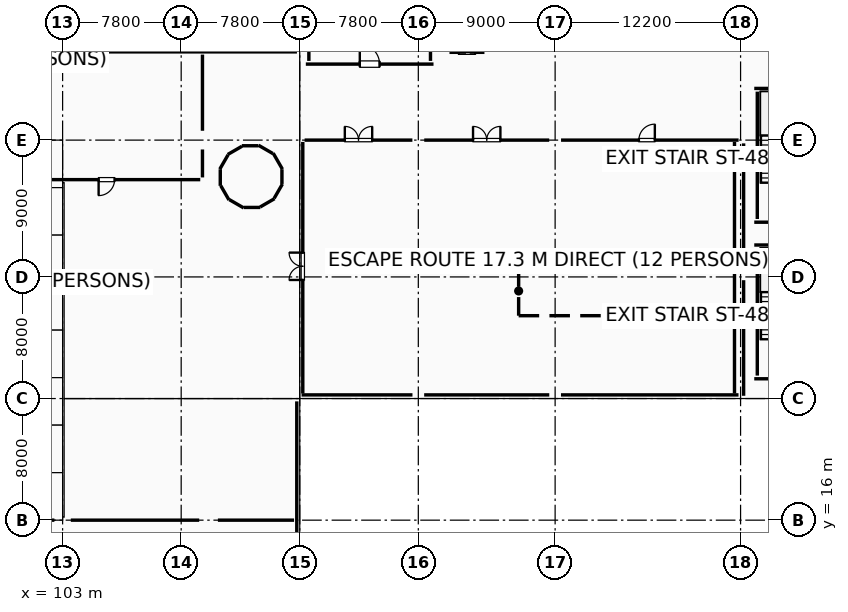
"""IFC4 building model, lengths in metres.
Left out: names, types, materials, properties, quantities, classifications, styles, units other than length and angle.
Written with IfcOpenShell. Run it as: python <this file> out.ifc"""

import sys

from ifc_helpers import new_model, si_unit, direction, frame, frame_2d, origin, origin_2d, place, context, subcontext, project, spatial, rectangle, i_section, extrude, element, fill, save


model = new_model("IFC4")
c1 = context("Model", 3, precision=1e-05, world=origin(), true_north=direction((0.0, 1.0)))
c2 = subcontext(c1, "Body", "Model", "MODEL_VIEW")
j1 = project(units=[si_unit("LENGTHUNIT", "METRE"), si_unit("PLANEANGLEUNIT", "RADIAN")], contexts=[c1])
p1 = place(None, origin())
s1 = spatial("IfcSite", under=j1, at=p1, CompositionType="ELEMENT")
p2 = place(p1, origin())
s2 = spatial("IfcBuilding", under=s1, at=p2, CompositionType="ELEMENT")
p3 = place(p2, frame((0.0, 0.0, 5.4)))
s3 = spatial("IfcBuildingStorey", under=s2, at=p3, CompositionType="ELEMENT", Elevation=5.4)
for number, where, z_axis, x_axis in (
    (1, (126.4, 24.0, 0.0), (0.0, 0.0, 1.0), (1.0, 0.0, 0.0)),
    (2, (126.4, 32.0, 0.0), (0.0, 0.0, 1.0), (1.0, 0.0, 0.0)),
    (3, (126.4, 41.0, 0.0), (0.0, 0.0, 1.0), (1.0, 0.0, 0.0)),
    (4, (135.4, 24.0, 0.0), (0.0, 0.0, 1.0), (1.0, 0.0, 0.0)),
    (5, (135.4, 41.0, 0.0), (0.0, 0.0, 1.0), (1.0, 0.0, 0.0)),
):
    element("IfcColumn", number, at=place(p3, frame(where, z_axis=z_axis, x_axis=x_axis)), inside=s3, PredefinedType="COLUMN", context=c2, shape_type="SweptSolid", body=[
        extrude(rectangle(XDim=0.75, YDim=0.75, at=origin_2d()), origin(), (0.0, 0.0, 1.0), 4.8),
    ])
for number, where, z_axis, x_axis in (
    (6, (147.6, 24.0, 0.0), (0.0, 0.0, 1.0), (1.0, 0.0, 0.0)),
    (7, (147.6, 32.0, 0.0), (0.0, 0.0, 1.0), (1.0, 0.0, 0.0)),
    (8, (147.6, 41.0, 0.0), (0.0, 0.0, 1.0), (1.0, 0.0, 0.0)),
):
    element("IfcColumn", number, at=place(p3, frame(where, z_axis=z_axis, x_axis=x_axis)), inside=s3, PredefinedType="COLUMN", context=c2, shape_type="SweptSolid", body=[
        extrude(i_section(OverallWidth=0.25, OverallDepth=0.4, WebThickness=0.01, FlangeThickness=0.013, FilletRadius=0.014, at=origin_2d()), origin(), (0.0, 0.0, 1.0), 4.8),
    ])
p4 = place(p3, frame((103.0, 47.0, 0.0), z_axis=(0.0, 0.0, 1.0), x_axis=(1.0, 0.0, 0.0)))
e9 = element("IfcColumn", 9, at=p4, inside=s3, PredefinedType="COLUMN", context=c2, shape_type="SweptSolid", body=[
    extrude(i_section(OverallWidth=0.25, OverallDepth=0.45, WebThickness=0.011, FlangeThickness=0.014, FilletRadius=0.015, at=origin_2d()), origin(), (0.0, 0.0, 1.0), 4.8),
])
for number, where, z_axis, x_axis in (
    (10, (103.0, 16.0, 0.0), (0.0, 0.0, 1.0), (1.0, 0.0, 0.0)),
    (11, (103.0, 41.0, 0.0), (0.0, 0.0, 1.0), (1.0, 0.0, 0.0)),
):
    element("IfcColumn", number, at=place(p3, frame(where, z_axis=z_axis, x_axis=x_axis)), inside=s3, PredefinedType="COLUMN", context=c2, shape_type="SweptSolid", body=[
        extrude(rectangle(XDim=1.05, YDim=1.05, at=origin_2d()), origin(), (0.0, 0.0, 1.0), 4.8),
    ])
for number, where, z_axis, x_axis in (
    (12, (112.6, 16.0, 0.0), (0.0, 0.0, 1.0), (1.0, 0.0, 0.0)),
    (13, (112.6, 41.0, 0.0), (0.0, 0.0, 1.0), (1.0, 0.0, 0.0)),
):
    element("IfcColumn", number, at=place(p3, frame(where, z_axis=z_axis, x_axis=x_axis)), inside=s3, PredefinedType="COLUMN", context=c2, shape_type="SweptSolid", body=[
        extrude(rectangle(XDim=1.2, YDim=1.2, at=origin_2d()), origin(), (0.0, 0.0, 1.0), 4.8),
    ])
p5 = place(p3, frame((103.129, 46.805, 0.0), z_axis=(0.0, 0.0, 1.0), x_axis=(1.0, 0.0, 0.0)))
e14 = element("IfcWall", 14, at=p5, inside=s3, PredefinedType="STANDARD", context=c2, shape_type="SweptSolid", body=[
    extrude(rectangle(XDim=15.286, YDim=0.35, at=frame_2d((7.643, 0.0))), origin(), (0.0, 0.0, 1.0), 3.725),
])
p6 = place(p3, frame((147.465, 24.24, 0.0), z_axis=(0.0, 0.0, 1.0), x_axis=(-1.0, 0.0, 0.0)))
e15 = element("IfcWall", 15, at=p6, inside=s3, PredefinedType="PARAPET", context=c2, shape_type="SweptSolid", body=[
    extrude(rectangle(XDim=11.68, YDim=0.18, at=frame_2d((5.84, 0.0))), origin(), (0.0, 0.0, 1.0), 0.88),
])
p7 = place(p3, frame((135.015, 24.24, 0.0), z_axis=(0.0, 0.0, 1.0), x_axis=(-1.0, 0.0, 0.0)))
e16 = element("IfcWall", 16, at=p7, inside=s3, PredefinedType="PARAPET", context=c2, shape_type="SweptSolid", body=[
    extrude(rectangle(XDim=8.23, YDim=0.18, at=frame_2d((4.115, 0.0))), origin(), (0.0, 0.0, 1.0), 0.88),
])
p8 = place(p3, frame((126.015, 24.24, 0.0), z_axis=(0.0, 0.0, 1.0), x_axis=(-1.0, 0.0, 0.0)))
e17 = element("IfcWall", 17, at=p8, inside=s3, PredefinedType="PARAPET", context=c2, shape_type="SweptSolid", body=[
    extrude(rectangle(XDim=7.295, YDim=0.18, at=frame_2d((3.647, 0.0))), origin(), (0.0, 0.0, 1.0), 0.88),
])
p9 = place(p3, frame((118.405, 23.815, 0.0), z_axis=(0.0, 0.0, 1.0), x_axis=(0.0, -1.0, 0.0)))
e18 = element("IfcWall", 18, at=p9, inside=s3, PredefinedType="STANDARD", context=c2, shape_type="SweptSolid", body=[
    extrude(rectangle(XDim=13.63, YDim=0.35, at=frame_2d((6.815, 0.0))), origin(), (0.0, 0.0, 1.0), 3.725),
])
p10 = place(p3, frame((119.0, 46.0, 0.0), z_axis=(0.0, 0.0, 1.0), x_axis=(1.0, 0.0, 0.0)))
e19 = element("IfcWall", 19, at=p10, inside=s3, PredefinedType="SHEAR", context=c2, shape_type="SweptSolid", body=[
    extrude(rectangle(XDim=8.4, YDim=0.4, at=frame_2d((4.2, 0.0))), origin(), (0.0, 0.0, 1.0), 4.54),
])
p11 = place(p10, frame((3.55, 0.0, 0.0)))
e20 = element("IfcOpeningElement", 20, at=p11, cuts=e19, PredefinedType="OPENING", context=c2, shape_type="SweptSolid", body=[
    extrude(rectangle(XDim=1.3, YDim=2.15, at=frame_2d((0.65, 1.075))), frame((0.0, 0.21, 0.0), z_axis=(0.0, -1.0, 0.0), x_axis=(1.0, 0.0, 0.0)), (0.0, 0.0, 1.0), 0.42),
])
for number, where, z_axis, x_axis in (
    (21, (127.2, 46.21, 0.0), (0.0, 0.0, 1.0), (0.0, 1.0, 0.0)),
    (22, (119.2, 54.59, 0.0), (0.0, 0.0, 1.0), (0.0, -1.0, 0.0)),
):
    element("IfcWall", number, at=place(p3, frame(where, z_axis=z_axis, x_axis=x_axis)), inside=s3, PredefinedType="SHEAR", context=c2, shape_type="SweptSolid", body=[
        extrude(rectangle(XDim=8.38, YDim=0.4, at=frame_2d((4.19, 0.0))), origin(), (0.0, 0.0, 1.0), 4.54),
    ])
p12 = place(p3, frame((128.45, 46.775, 0.0), z_axis=(0.0, 0.0, 1.0), x_axis=(1.0, 0.0, 0.0)))
e23 = element("IfcWall", 23, at=p12, inside=s3, PredefinedType="STANDARD", context=c2, shape_type="SweptSolid", body=[
    extrude(rectangle(XDim=2.3, YDim=0.25, at=frame_2d((1.15, 0.0))), origin(), (0.0, 0.0, 1.0), 4.53),
])
p13 = place(p12, frame((0.6, 0.0, 0.0)))
e24 = element("IfcOpeningElement", 24, at=p13, cuts=e23, PredefinedType="OPENING", context=c2, shape_type="SweptSolid", body=[
    extrude(rectangle(XDim=1.1, YDim=2.15, at=frame_2d((0.55, 1.075))), frame((0.0, 0.135, 0.0), z_axis=(0.0, -1.0, 0.0), x_axis=(1.0, 0.0, 0.0)), (0.0, 0.0, 1.0), 0.27),
])
p14 = place(p3, frame((148.5, 25.3, 0.0), z_axis=(0.0, 0.0, 1.0), x_axis=(1.0, 0.0, 0.0)))
e25 = element("IfcWall", 25, at=p14, inside=s3, PredefinedType="SHEAR", context=c2, shape_type="SweptSolid", body=[
    extrude(rectangle(XDim=8.4, YDim=0.4, at=frame_2d((4.2, 0.0))), origin(), (0.0, 0.0, 1.0), 4.54),
])
p15 = place(p14, frame((3.55, 0.0, 0.0)))
e26 = element("IfcOpeningElement", 26, at=p15, cuts=e25, PredefinedType="OPENING", context=c2, shape_type="SweptSolid", body=[
    extrude(rectangle(XDim=1.3, YDim=2.15, at=frame_2d((0.65, 1.075))), frame((0.0, 0.21, 0.0), z_axis=(0.0, -1.0, 0.0), x_axis=(1.0, 0.0, 0.0)), (0.0, 0.0, 1.0), 0.42),
])
p16 = place(p3, frame((156.9, 34.1, 0.0), z_axis=(0.0, 0.0, 1.0), x_axis=(-1.0, 0.0, 0.0)))
e27 = element("IfcWall", 27, at=p16, inside=s3, PredefinedType="SHEAR", context=c2, shape_type="SweptSolid", body=[
    extrude(rectangle(XDim=8.4, YDim=0.4, at=frame_2d((4.2, 0.0))), origin(), (0.0, 0.0, 1.0), 4.54),
])
p17 = place(p3, frame((148.7, 33.89, 0.0), z_axis=(0.0, 0.0, 1.0), x_axis=(0.0, -1.0, 0.0)))
e28 = element("IfcWall", 28, at=p17, inside=s3, PredefinedType="SHEAR", context=c2, shape_type="SweptSolid", body=[
    extrude(rectangle(XDim=8.38, YDim=0.4, at=frame_2d((4.19, 0.0))), origin(), (0.0, 0.0, 1.0), 4.54),
])
p18 = place(p3, frame((148.5, 35.6, 0.0), z_axis=(0.0, 0.0, 1.0), x_axis=(1.0, 0.0, 0.0)))
e29 = element("IfcWall", 29, at=p18, inside=s3, PredefinedType="SHEAR", context=c2, shape_type="SweptSolid", body=[
    extrude(rectangle(XDim=8.4, YDim=0.4, at=frame_2d((4.2, 0.0))), origin(), (0.0, 0.0, 1.0), 4.54),
])
p19 = place(p18, frame((3.55, 0.0, 0.0)))
e30 = element("IfcOpeningElement", 30, at=p19, cuts=e29, PredefinedType="OPENING", context=c2, shape_type="SweptSolid", body=[
    extrude(rectangle(XDim=1.3, YDim=2.15, at=frame_2d((0.65, 1.075))), frame((0.0, 0.21, 0.0), z_axis=(0.0, -1.0, 0.0), x_axis=(1.0, 0.0, 0.0)), (0.0, 0.0, 1.0), 0.42),
])
p20 = place(p3, frame((156.9, 44.4, 0.0), z_axis=(0.0, 0.0, 1.0), x_axis=(-1.0, 0.0, 0.0)))
e31 = element("IfcWall", 31, at=p20, inside=s3, PredefinedType="SHEAR", context=c2, shape_type="SweptSolid", body=[
    extrude(rectangle(XDim=8.4, YDim=0.4, at=frame_2d((4.2, 0.0))), origin(), (0.0, 0.0, 1.0), 4.54),
])
p21 = place(p3, frame((148.7, 44.19, 0.0), z_axis=(0.0, 0.0, 1.0), x_axis=(0.0, -1.0, 0.0)))
e32 = element("IfcWall", 32, at=p21, inside=s3, PredefinedType="SHEAR", context=c2, shape_type="SweptSolid", body=[
    extrude(rectangle(XDim=8.38, YDim=0.4, at=frame_2d((4.19, 0.0))), origin(), (0.0, 0.0, 1.0), 4.54),
])
p22 = place(p3, frame((117.461, 39.086, 0.0), z_axis=(0.0, 0.0, 1.0), x_axis=(-0.500080723117, 0.865978793255, 0.0)))
e33 = element("IfcWall", 33, at=p22, inside=s3, PredefinedType="SHEAR", context=c2, shape_type="SweptSolid", body=[
    extrude(rectangle(XDim=1.219, YDim=0.35, at=frame_2d((0.609, 0.0))), origin(), (0.0, 0.0, 1.0), 4.54),
])
for number, where, z_axis, x_axis in (
    (34, (116.833, 40.115, 0.0), (0.0, 0.0, 1.0), (-0.866, 0.5, 0.0)),
    (35, (115.884, 40.628, 0.0), (0.0, 0.0, 1.0), (-1.0, 0.0, 0.0)),
    (36, (114.804, 40.598, 0.0), (0.0, 0.0, 1.0), (-0.866, -0.5, 0.0)),
    (37, (113.885, 40.033, 0.0), (0.0, 0.0, 1.0), (-0.5, -0.866, 0.0)),
    (38, (113.372, 39.083, 0.0), (0.0, 0.0, 1.0), (0.0, -1.0, 0.0)),
    (39, (113.402, 38.004, 0.0), (0.0, 0.0, 1.0), (0.5, -0.866, 0.0)),
    (40, (113.967, 37.085, 0.0), (0.0, 0.0, 1.0), (0.866, -0.5, 0.0)),
    (41, (114.917, 36.572, 0.0), (0.0, 0.0, 1.0), (1.0, 0.0, 0.0)),
    (42, (115.996, 36.602, 0.0), (0.0, 0.0, 1.0), (0.866, 0.5, 0.0)),
    (43, (116.915, 37.167, 0.0), (0.0, 0.0, 1.0), (0.5, 0.866, 0.0)),
):
    element("IfcWall", number, at=place(p3, frame(where, z_axis=z_axis, x_axis=x_axis)), inside=s3, PredefinedType="SHEAR", context=c2, shape_type="SweptSolid", body=[
        extrude(rectangle(XDim=1.093, YDim=0.35, at=frame_2d((0.546, 0.0))), origin(), (0.0, 0.0, 1.0), 4.54),
    ])
p23 = place(p3, frame((117.428, 38.116, 0.0), z_axis=(0.0, 0.0, 1.0), x_axis=(0.0, 1.0, 0.0)))
e44 = element("IfcWall", 44, at=p23, inside=s3, PredefinedType="SHEAR", context=c2, shape_type="SweptSolid", body=[
    extrude(rectangle(XDim=0.967, YDim=0.35, at=frame_2d((0.483, 0.0))), origin(), (0.0, 0.0, 1.0), 4.54),
])
p24 = place(p3, frame((112.2, 46.626, 0.0), z_axis=(0.0, 0.0, 1.0), x_axis=(0.0, -1.0, 0.0)))
e45 = element("IfcWall", 45, at=p24, inside=s3, PredefinedType="PARTITIONING", context=c2, shape_type="SweptSolid", body=[
    extrude(rectangle(XDim=5.011, YDim=0.25, at=frame_2d((2.505, 0.0))), origin(), (0.0, 0.0, 1.0), 3.72),
])
p25 = place(p3, frame((112.2, 40.385, 0.0), z_axis=(0.0, 0.0, 1.0), x_axis=(0.0, -1.0, 0.0)))
e46 = element("IfcWall", 46, at=p25, inside=s3, PredefinedType="PARTITIONING", context=c2, shape_type="SweptSolid", body=[
    extrude(rectangle(XDim=1.84, YDim=0.25, at=frame_2d((0.92, 0.0))), origin(), (0.0, 0.0, 1.0), 3.72),
])
p26 = place(p3, frame((112.055, 38.4, 0.0), z_axis=(0.0, 0.0, 1.0), x_axis=(-1.0, 0.0, 0.0)))
e47 = element("IfcWall", 47, at=p26, inside=s3, PredefinedType="PARTITIONING", context=c2, shape_type="SweptSolid", body=[
    extrude(rectangle(XDim=41.31, YDim=0.25, at=frame_2d((20.655, 0.0))), origin(), (0.0, 0.0, 1.0), 3.72),
])
p27 = place(p26, frame((5.636, 0.0, 0.0)))
e48 = element("IfcOpeningElement", 48, at=p27, cuts=e47, PredefinedType="OPENING", context=c2, shape_type="SweptSolid", body=[
    extrude(rectangle(XDim=1.05, YDim=2.15, at=frame_2d((0.525, 1.075))), frame((0.0, 0.135, 0.0), z_axis=(0.0, -1.0, 0.0), x_axis=(1.0, 0.0, 0.0)), (0.0, 0.0, 1.0), 0.27),
])
p28 = place(p3, frame((95.74, 16.0, 0.0), z_axis=(0.0, 0.0, 1.0), x_axis=(1.0, 0.0, 0.0)))
e49 = element("IfcWall", 49, at=p28, inside=s3, PredefinedType="PARTITIONING", context=c2, shape_type="SweptSolid", body=[
    extrude(rectangle(XDim=6.72, YDim=0.15, at=frame_2d((3.36, 0.0))), origin(), (0.0, 0.0, 1.0), 3.72),
])
p29 = place(p3, frame((103.54, 16.0, 0.0), z_axis=(0.0, 0.0, 1.0), x_axis=(1.0, 0.0, 0.0)))
e50 = element("IfcWall", 50, at=p29, inside=s3, PredefinedType="PARTITIONING", context=c2, shape_type="SweptSolid", body=[
    extrude(rectangle(XDim=8.445, YDim=0.15, at=frame_2d((4.223, 0.0))), origin(), (0.0, 0.0, 1.0), 3.72),
])
p30 = place(p3, frame((113.215, 16.0, 0.0), z_axis=(0.0, 0.0, 1.0), x_axis=(1.0, 0.0, 0.0)))
e51 = element("IfcWall", 51, at=p30, inside=s3, PredefinedType="PARTITIONING", context=c2, shape_type="SweptSolid", body=[
    extrude(rectangle(XDim=5.011, YDim=0.15, at=frame_2d((2.505, 0.0))), origin(), (0.0, 0.0, 1.0), 3.72),
])
p31 = place(p3, frame((118.92, 41.0, 0.0), z_axis=(0.0, 0.0, 1.0), x_axis=(1.0, 0.0, 0.0)))
e52 = element("IfcWall", 52, at=p31, inside=s3, PredefinedType="PARTITIONING", context=c2, shape_type="SweptSolid", body=[
    extrude(rectangle(XDim=7.09, YDim=0.2, at=frame_2d((3.545, 0.0))), origin(), (0.0, 0.0, 1.0), 4.53),
])
p32 = place(p31, frame((2.645, 0.0, 0.0)))
e53 = element("IfcOpeningElement", 53, at=p32, cuts=e52, PredefinedType="OPENING", context=c2, shape_type="SweptSolid", body=[
    extrude(rectangle(XDim=1.8, YDim=2.15, at=frame_2d((0.9, 1.075))), frame((0.0, 0.11, 0.0), z_axis=(0.0, -1.0, 0.0), x_axis=(1.0, 0.0, 0.0)), (0.0, 0.0, 1.0), 0.22),
])
p33 = place(p3, frame((126.79, 41.0, 0.0), z_axis=(0.0, 0.0, 1.0), x_axis=(1.0, 0.0, 0.0)))
e54 = element("IfcWall", 54, at=p33, inside=s3, PredefinedType="PARTITIONING", context=c2, shape_type="SweptSolid", body=[
    extrude(rectangle(XDim=8.22, YDim=0.2, at=frame_2d((4.11, 0.0))), origin(), (0.0, 0.0, 1.0), 3.89),
])
p34 = place(p33, frame((3.21, 0.0, 0.0)))
e55 = element("IfcOpeningElement", 55, at=p34, cuts=e54, PredefinedType="OPENING", context=c2, shape_type="SweptSolid", body=[
    extrude(rectangle(XDim=1.8, YDim=2.15, at=frame_2d((0.9, 1.075))), frame((0.0, 0.11, 0.0), z_axis=(0.0, -1.0, 0.0), x_axis=(1.0, 0.0, 0.0)), (0.0, 0.0, 1.0), 0.22),
])
p35 = place(p3, frame((135.79, 41.0, 0.0), z_axis=(0.0, 0.0, 1.0), x_axis=(1.0, 0.0, 0.0)))
e56 = element("IfcWall", 56, at=p35, inside=s3, PredefinedType="PARTITIONING", context=c2, shape_type="SweptSolid", body=[
    extrude(rectangle(XDim=11.681, YDim=0.2, at=frame_2d((5.84, 0.0))), origin(), (0.0, 0.0, 1.0), 3.89),
])
p36 = place(p35, frame((5.12, 0.0, 0.0)))
e57 = element("IfcOpeningElement", 57, at=p36, cuts=e56, PredefinedType="OPENING", context=c2, shape_type="SweptSolid", body=[
    extrude(rectangle(XDim=1.05, YDim=2.15, at=frame_2d((0.525, 1.075))), frame((0.0, 0.11, 0.0), z_axis=(0.0, -1.0, 0.0), x_axis=(1.0, 0.0, 0.0)), (0.0, 0.0, 1.0), 0.22),
])
p37 = place(p3, frame((147.2, 40.88, 0.0), z_axis=(0.0, 0.0, 1.0), x_axis=(0.0, -1.0, 0.0)))
e58 = element("IfcWall", 58, at=p37, inside=s3, PredefinedType="PARTITIONING", context=c2, shape_type="SweptSolid", body=[
    extrude(rectangle(XDim=16.546, YDim=0.2, at=frame_2d((8.273, 0.0))), origin(), (0.0, 0.0, 1.0), 3.89),
])
p38 = place(p3, frame((118.8, 24.334, 0.0), z_axis=(0.0, 0.0, 1.0), x_axis=(0.0, 1.0, 0.0)))
e59 = element("IfcWall", 59, at=p38, inside=s3, PredefinedType="PARTITIONING", context=c2, shape_type="SweptSolid", body=[
    extrude(rectangle(XDim=16.546, YDim=0.2, at=frame_2d((8.273, 0.0))), origin(), (0.0, 0.0, 1.0), 3.72),
])
p39 = place(p38, frame((7.466, 0.0, 0.0)))
e60 = element("IfcOpeningElement", 60, at=p39, cuts=e59, PredefinedType="OPENING", context=c2, shape_type="SweptSolid", body=[
    extrude(rectangle(XDim=1.8, YDim=2.15, at=frame_2d((0.9, 1.075))), frame((0.0, 0.11, 0.0), z_axis=(0.0, -1.0, 0.0), x_axis=(1.0, 0.0, 0.0)), (0.0, 0.0, 1.0), 0.22),
])
p40 = place(p3, frame((147.8, 24.182, 0.0), z_axis=(0.0, 0.0, 1.0), x_axis=(0.0, 1.0, 0.0)))
e61 = element("IfcWall", 61, at=p40, inside=s3, PredefinedType="MOVABLE", context=c2, shape_type="SweptSolid", body=[
    extrude(rectangle(XDim=7.603, YDim=0.11, at=frame_2d((3.802, 0.0))), origin(), (0.0, 0.0, 1.0), 3.89),
])
p41 = place(p3, frame((147.8, 32.215, 0.0), z_axis=(0.0, 0.0, 1.0), x_axis=(0.0, 1.0, 0.0)))
e62 = element("IfcWall", 62, at=p41, inside=s3, PredefinedType="MOVABLE", context=c2, shape_type="SweptSolid", body=[
    extrude(rectangle(XDim=8.57, YDim=0.11, at=frame_2d((4.285, 0.0))), origin(), (0.0, 0.0, 1.0), 3.89),
])
p42 = place(p11, origin())
e63 = element("IfcDoor", 63, at=p42, inside=s3, OperationType="SINGLE_SWING_LEFT", PredefinedType="DOOR", context=c2, shape_type="SweptSolid", body=[
    extrude(rectangle(XDim=1.3, YDim=2.15, at=frame_2d((0.65, 1.075))), frame((0.0, 0.025, 0.0), z_axis=(0.0, -1.0, 0.0), x_axis=(1.0, 0.0, 0.0)), (0.0, 0.0, 1.0), 0.05),
])
fill(e20, e63)
p43 = place(p13, origin())
e64 = element("IfcDoor", 64, at=p43, inside=s3, OperationType="DOUBLE_DOOR_SLIDING", PredefinedType="DOOR", context=c2, shape_type="SweptSolid", body=[
    extrude(rectangle(XDim=1.1, YDim=2.15, at=frame_2d((0.55, 1.075))), frame((0.0, 0.025, 0.0), z_axis=(0.0, -1.0, 0.0), x_axis=(1.0, 0.0, 0.0)), (0.0, 0.0, 1.0), 0.05),
])
fill(e24, e64)
p44 = place(p27, origin())
e65 = element("IfcDoor", 65, at=p44, inside=s3, OperationType="SINGLE_SWING_RIGHT", PredefinedType="DOOR", context=c2, shape_type="SweptSolid", body=[
    extrude(rectangle(XDim=1.05, YDim=2.15, at=frame_2d((0.525, 1.075))), frame((0.0, 0.025, 0.0), z_axis=(0.0, -1.0, 0.0), x_axis=(1.0, 0.0, 0.0)), (0.0, 0.0, 1.0), 0.05),
])
fill(e48, e65)
p45 = place(p36, origin())
e66 = element("IfcDoor", 66, at=p45, inside=s3, OperationType="SINGLE_SWING_RIGHT", PredefinedType="DOOR", context=c2, shape_type="SweptSolid", body=[
    extrude(rectangle(XDim=1.05, YDim=2.15, at=frame_2d((0.525, 1.075))), frame((0.0, 0.025, 0.0), z_axis=(0.0, -1.0, 0.0), x_axis=(1.0, 0.0, 0.0)), (0.0, 0.0, 1.0), 0.05),
])
fill(e57, e66)
p46 = place(p32, origin())
e67 = element("IfcDoor", 67, at=p46, inside=s3, OperationType="DOUBLE_DOOR_SINGLE_SWING", PredefinedType="DOOR", context=c2, shape_type="SweptSolid", body=[
    extrude(rectangle(XDim=1.8, YDim=2.15, at=frame_2d((0.9, 1.075))), frame((0.0, 0.025, 0.0), z_axis=(0.0, -1.0, 0.0), x_axis=(1.0, 0.0, 0.0)), (0.0, 0.0, 1.0), 0.05),
])
fill(e53, e67)
p47 = place(p34, origin())
e68 = element("IfcDoor", 68, at=p47, inside=s3, OperationType="DOUBLE_DOOR_SINGLE_SWING", PredefinedType="DOOR", context=c2, shape_type="SweptSolid", body=[
    extrude(rectangle(XDim=1.8, YDim=2.15, at=frame_2d((0.9, 1.075))), frame((0.0, 0.025, 0.0), z_axis=(0.0, -1.0, 0.0), x_axis=(1.0, 0.0, 0.0)), (0.0, 0.0, 1.0), 0.05),
])
fill(e55, e68)
p48 = place(p39, origin())
e69 = element("IfcDoor", 69, at=p48, inside=s3, OperationType="DOUBLE_DOOR_SINGLE_SWING", PredefinedType="DOOR", context=c2, shape_type="SweptSolid", body=[
    extrude(rectangle(XDim=1.8, YDim=2.15, at=frame_2d((0.9, 1.075))), frame((0.0, 0.025, 0.0), z_axis=(0.0, -1.0, 0.0), x_axis=(1.0, 0.0, 0.0)), (0.0, 0.0, 1.0), 0.05),
])
fill(e60, e69)
save(model, sys.argv[1])
